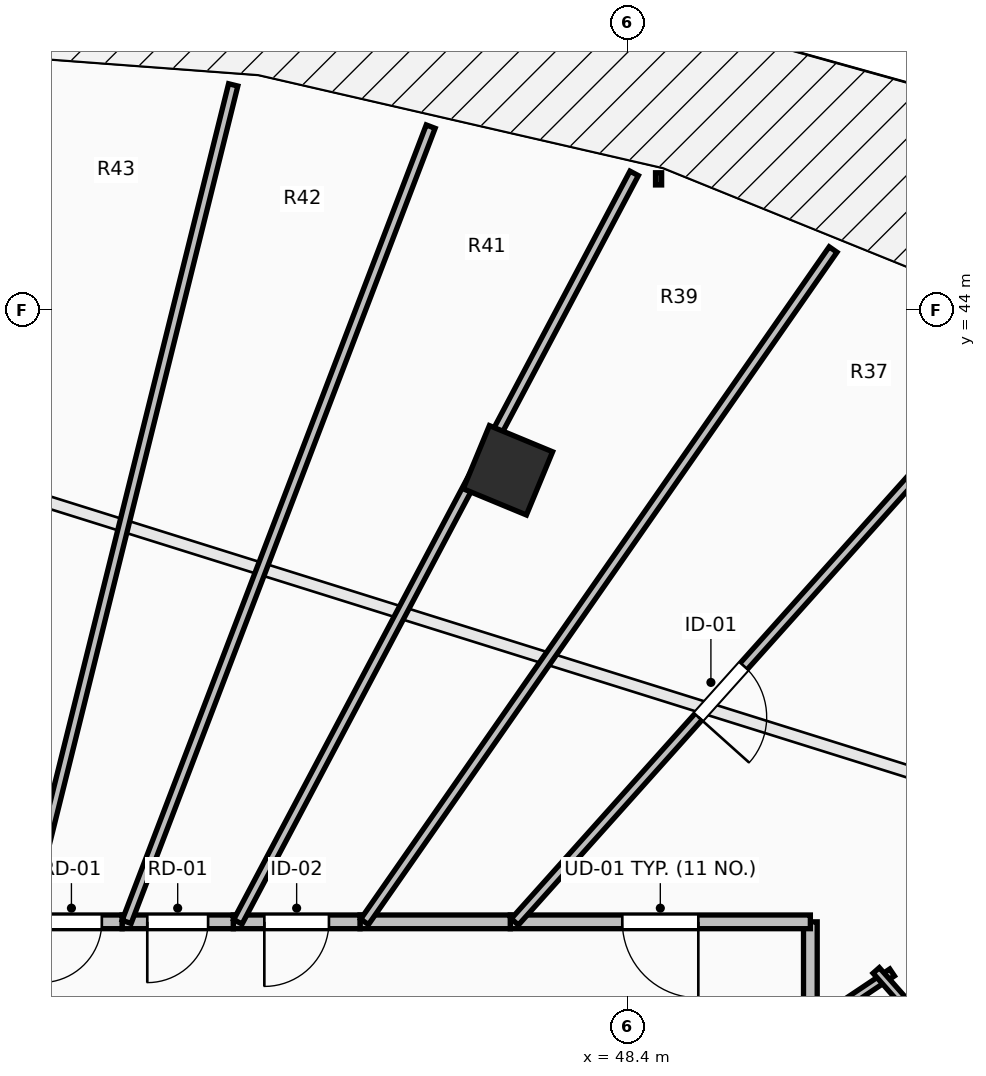
"""IFC4 building model, lengths in metres.
Left out: names, types, materials, properties, quantities, classifications, styles, units other than length and angle.
Written with IfcOpenShell. Run it as: python <this file> out.ifc"""

import sys

from ifc_helpers import new_model, si_unit, direction, frame, frame_2d, origin, origin_2d, place, context, subcontext, project, spatial, rectangle, extrude, element, fill, save


model = new_model("IFC4")
c1 = context("Model", 3, precision=1e-05, world=origin(), true_north=direction((0.0, 1.0)))
c2 = subcontext(c1, "Body", "Model", "MODEL_VIEW")
j1 = project(units=[si_unit("LENGTHUNIT", "METRE"), si_unit("PLANEANGLEUNIT", "RADIAN")], contexts=[c1])
p1 = place(None, origin())
s1 = spatial("IfcSite", under=j1, at=p1, CompositionType="ELEMENT")
p2 = place(p1, origin())
s2 = spatial("IfcBuilding", under=s1, at=p2, CompositionType="ELEMENT")
p3 = place(p2, frame((0.0, 0.0, 217.85)))
s3 = spatial("IfcBuildingStorey", under=s2, at=p3, CompositionType="ELEMENT", Elevation=217.85)
p4 = place(p3, frame((46.821, 41.891, 0.0), z_axis=(0.0, 0.0, 1.0), x_axis=(0.382683432365, 0.923879532511, 0.0)))
e1 = element("IfcColumn", 1, at=p4, inside=s3, PredefinedType="COLUMN", context=c2, shape_type="SweptSolid", body=[
    extrude(rectangle(XDim=0.9, YDim=0.9, at=origin_2d()), origin(), (0.0, 0.0, 1.0), 3.55),
])
p5 = place(p3, frame((50.8, 34.504, 0.0), z_axis=(0.0, 0.0, 1.0), x_axis=(0.0, 1.0, 0.0)))
e2 = element("IfcWall", 2, at=p5, inside=s3, PredefinedType="PARTITIONING", context=c2, shape_type="SweptSolid", body=[
    extrude(rectangle(XDim=1.446, YDim=0.18, at=frame_2d((0.723, 0.0))), origin(), (0.0, 0.0, 1.0), 2.482),
])
p6 = place(p3, frame((50.8, 35.95, 0.0), z_axis=(0.0, 0.0, 1.0), x_axis=(-1.0, 0.0, 0.0)))
e3 = element("IfcWall", 3, at=p6, inside=s3, PredefinedType="PARTITIONING", context=c2, shape_type="SweptSolid", body=[
    extrude(rectangle(XDim=3.948, YDim=0.18, at=frame_2d((1.974, 0.0))), origin(), (0.0, 0.0, 1.0), 2.482),
])
p7 = place(p6, frame((1.474, 0.0, 0.0)))
e4 = element("IfcOpeningElement", 4, at=p7, cuts=e3, PredefinedType="OPENING", context=c2, shape_type="SweptSolid", body=[
    extrude(rectangle(XDim=1.0, YDim=2.15, at=frame_2d((0.5, 1.075))), frame((0.0, 0.105, 0.0), z_axis=(0.0, -1.0, 0.0), x_axis=(1.0, 0.0, 0.0)), (0.0, 0.0, 1.0), 0.21),
])
p8 = place(p3, frame((46.852, 35.95, 0.0), z_axis=(0.0, 0.0, 1.0), x_axis=(-1.0, 0.0, 0.0)))
e5 = element("IfcWall", 5, at=p8, inside=s3, PredefinedType="PARTITIONING", context=c2, shape_type="SweptSolid", body=[
    extrude(rectangle(XDim=1.977, YDim=0.18, at=frame_2d((0.989, 0.0))), origin(), (0.0, 0.0, 1.0), 3.29),
])
p9 = place(p3, frame((44.875, 35.95, 0.0), z_axis=(0.0, 0.0, 1.0), x_axis=(-1.0, 0.0, 0.0)))
e6 = element("IfcWall", 6, at=p9, inside=s3, PredefinedType="PARTITIONING", context=c2, shape_type="SweptSolid", body=[
    extrude(rectangle(XDim=1.667, YDim=0.18, at=frame_2d((0.833, 0.0))), origin(), (0.0, 0.0, 1.0), 3.29),
])
p10 = place(p9, frame((0.408, 0.0, 0.0)))
e7 = element("IfcOpeningElement", 7, at=p10, cuts=e6, PredefinedType="OPENING", context=c2, shape_type="SweptSolid", body=[
    extrude(rectangle(XDim=0.85, YDim=2.1, at=frame_2d((0.425, 1.05))), frame((0.0, 0.105, 0.0), z_axis=(0.0, -1.0, 0.0), x_axis=(1.0, 0.0, 0.0)), (0.0, 0.0, 1.0), 0.21),
])
p11 = place(p3, frame((43.208, 35.95, 0.0), z_axis=(0.0, 0.0, 1.0), x_axis=(-1.0, 0.0, 0.0)))
e8 = element("IfcWall", 8, at=p11, inside=s3, PredefinedType="PARTITIONING", context=c2, shape_type="SweptSolid", body=[
    extrude(rectangle(XDim=1.463, YDim=0.18, at=frame_2d((0.731, 0.0))), origin(), (0.0, 0.0, 1.0), 3.29),
])
p12 = place(p11, frame((0.332, 0.0, 0.0)))
e9 = element("IfcOpeningElement", 9, at=p12, cuts=e8, PredefinedType="OPENING", context=c2, shape_type="SweptSolid", body=[
    extrude(rectangle(XDim=0.8, YDim=2.05, at=frame_2d((0.4, 1.025))), frame((0.0, 0.105, 0.0), z_axis=(0.0, -1.0, 0.0), x_axis=(1.0, 0.0, 0.0)), (0.0, 0.0, 1.0), 0.21),
])
p13 = place(p3, frame((41.745, 35.95, 0.0), z_axis=(0.0, 0.0, 1.0), x_axis=(-1.0, 0.0, 0.0)))
e10 = element("IfcWall", 10, at=p13, inside=s3, PredefinedType="PARTITIONING", context=c2, shape_type="SweptSolid", body=[
    extrude(rectangle(XDim=1.333, YDim=0.18, at=frame_2d((0.667, 0.0))), origin(), (0.0, 0.0, 1.0), 3.29),
])
p14 = place(p13, frame((0.267, 0.0, 0.0)))
e11 = element("IfcOpeningElement", 11, at=p14, cuts=e10, PredefinedType="OPENING", context=c2, shape_type="SweptSolid", body=[
    extrude(rectangle(XDim=0.8, YDim=2.05, at=frame_2d((0.4, 1.025))), frame((0.0, 0.105, 0.0), z_axis=(0.0, -1.0, 0.0), x_axis=(1.0, 0.0, 0.0)), (0.0, 0.0, 1.0), 0.21),
])
p15 = place(p3, frame((50.684, 34.486, 0.0), z_axis=(0.0, 0.0, 1.0), x_axis=(0.830948636418, 0.556349138253, 0.0)))
e12 = element("IfcWall", 12, at=p15, inside=s3, PredefinedType="PARTITIONING", context=c2, shape_type="SweptSolid", body=[
    extrude(rectangle(XDim=1.434, YDim=0.11, at=frame_2d((0.717, 0.0))), origin(), (0.0, 0.0, 1.0), 2.924),
])
p16 = place(p3, frame((51.666, 35.311, 0.0), z_axis=(0.0, 0.0, 1.0), x_axis=(0.662288118602, -0.749249256228, 0.0)))
e13 = element("IfcWall", 13, at=p16, inside=s3, PredefinedType="PARTITIONING", context=c2, shape_type="SweptSolid", body=[
    extrude(rectangle(XDim=3.706, YDim=0.11, at=frame_2d((1.853, 0.0))), origin(), (0.0, 0.0, 1.0), 2.482),
])
p17 = place(p16, frame((1.428, 0.0, 0.0)))
e14 = element("IfcOpeningElement", 14, at=p17, cuts=e13, PredefinedType="OPENING", context=c2, shape_type="SweptSolid", body=[
    extrude(rectangle(XDim=0.85, YDim=2.1, at=frame_2d((0.425, 1.05))), frame((0.0, 0.07, 0.0), z_axis=(0.0, -1.0, 0.0), x_axis=(1.0, 0.0, 0.0)), (0.0, 0.0, 1.0), 0.14),
])
p18 = place(p3, frame((52.34, 42.01, 0.0), z_axis=(0.0, 0.0, 1.0), x_axis=(-0.667173742476, -0.744902139445, 0.0)))
e15 = element("IfcWall", 15, at=p18, inside=s3, PredefinedType="PARTITIONING", context=c2, shape_type="SweptSolid", body=[
    extrude(rectangle(XDim=8.135, YDim=0.125, at=frame_2d((4.067, 0.0))), origin(), (0.0, 0.0, 1.0), 2.482),
])
p19 = place(p18, frame((3.617, 0.0, 0.0)))
e16 = element("IfcOpeningElement", 16, at=p19, cuts=e15, PredefinedType="OPENING", context=c2, shape_type="SweptSolid", body=[
    extrude(rectangle(XDim=0.9, YDim=2.1, at=frame_2d((0.45, 1.05))), frame((0.0, 0.077, 0.0), z_axis=(0.0, -1.0, 0.0), x_axis=(1.0, 0.0, 0.0)), (0.0, 0.0, 1.0), 0.155),
])
p20 = place(p3, frame((51.099, 44.795, 0.0), z_axis=(0.0, 0.0, 1.0), x_axis=(-0.571754326018, -0.82042488424, 0.0)))
e17 = element("IfcWall", 17, at=p20, inside=s3, PredefinedType="PARTITIONING", context=c2, shape_type="SweptSolid", body=[
    extrude(rectangle(XDim=10.781, YDim=0.125, at=frame_2d((5.391, 0.0))), origin(), (0.0, 0.0, 1.0), 2.482),
])
p21 = place(p3, frame((48.482, 45.797, 0.0), z_axis=(0.0, 0.0, 1.0), x_axis=(-0.46793402924, -0.883763398359, 0.0)))
e18 = element("IfcWall", 18, at=p21, inside=s3, PredefinedType="PARTITIONING", context=c2, shape_type="SweptSolid", body=[
    extrude(rectangle(XDim=11.142, YDim=0.125, at=frame_2d((5.571, 0.0))), origin(), (0.0, 0.0, 1.0), 2.824),
])
p22 = place(p3, frame((45.805, 46.412, 0.0), z_axis=(0.0, 0.0, 1.0), x_axis=(-0.357119008819, -0.934058891901, 0.0)))
e19 = element("IfcWall", 19, at=p22, inside=s3, PredefinedType="PARTITIONING", context=c2, shape_type="SweptSolid", body=[
    extrude(rectangle(XDim=11.201, YDim=0.125, at=frame_2d((5.6, 0.0))), origin(), (0.0, 0.0, 1.0), 2.824),
])
p23 = place(p3, frame((43.207, 46.961, 0.0), z_axis=(0.0, 0.0, 1.0), x_axis=(-0.241072089133, -0.970507211638, 0.0)))
e20 = element("IfcWall", 20, at=p23, inside=s3, PredefinedType="PARTITIONING", context=c2, shape_type="SweptSolid", body=[
    extrude(rectangle(XDim=11.346, YDim=0.125, at=frame_2d((5.673, 0.0))), origin(), (0.0, 0.0, 1.0), 2.824),
])
p24 = place(p7, origin())
e21 = element("IfcDoor", 21, at=p24, inside=s3, OperationType="SINGLE_SWING_LEFT", PredefinedType="DOOR", context=c2, shape_type="SweptSolid", body=[
    extrude(rectangle(XDim=1.0, YDim=2.15, at=frame_2d((0.5, 1.075))), frame((0.0, 0.025, 0.0), z_axis=(0.0, -1.0, 0.0), x_axis=(1.0, 0.0, 0.0)), (0.0, 0.0, 1.0), 0.05),
])
fill(e4, e21)
p25 = place(p19, origin())
e22 = element("IfcDoor", 22, at=p25, inside=s3, OperationType="SINGLE_SWING_RIGHT", PredefinedType="DOOR", context=c2, shape_type="SweptSolid", body=[
    extrude(rectangle(XDim=0.9, YDim=2.1, at=frame_2d((0.45, 1.05))), frame((0.0, 0.025, 0.0), z_axis=(0.0, -1.0, 0.0), x_axis=(1.0, 0.0, 0.0)), (0.0, 0.0, 1.0), 0.05),
])
fill(e16, e22)
p26 = place(p10, origin())
e23 = element("IfcDoor", 23, at=p26, inside=s3, OperationType="SINGLE_SWING_RIGHT", PredefinedType="DOOR", context=c2, shape_type="SweptSolid", body=[
    extrude(rectangle(XDim=0.85, YDim=2.1, at=frame_2d((0.425, 1.05))), frame((0.0, 0.025, 0.0), z_axis=(0.0, -1.0, 0.0), x_axis=(1.0, 0.0, 0.0)), (0.0, 0.0, 1.0), 0.05),
])
fill(e7, e23)
p27 = place(p12, origin())
e24 = element("IfcDoor", 24, at=p27, inside=s3, OperationType="SINGLE_SWING_RIGHT", PredefinedType="DOOR", context=c2, shape_type="SweptSolid", body=[
    extrude(rectangle(XDim=0.8, YDim=2.05, at=frame_2d((0.4, 1.025))), frame((0.0, 0.025, 0.0), z_axis=(0.0, -1.0, 0.0), x_axis=(1.0, 0.0, 0.0)), (0.0, 0.0, 1.0), 0.05),
])
fill(e9, e24)
p28 = place(p14, origin())
e25 = element("IfcDoor", 25, at=p28, inside=s3, OperationType="SINGLE_SWING_RIGHT", PredefinedType="DOOR", context=c2, shape_type="SweptSolid", body=[
    extrude(rectangle(XDim=0.8, YDim=2.05, at=frame_2d((0.4, 1.025))), frame((0.0, 0.025, 0.0), z_axis=(0.0, -1.0, 0.0), x_axis=(1.0, 0.0, 0.0)), (0.0, 0.0, 1.0), 0.05),
])
fill(e11, e25)
save(model, sys.argv[1])
